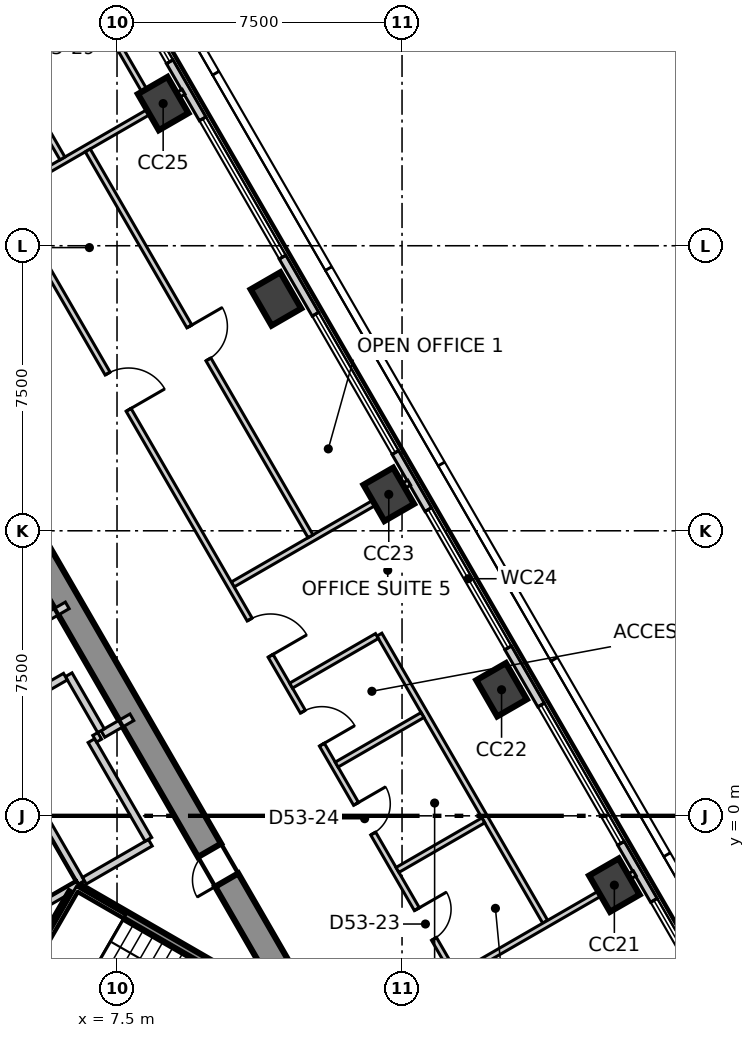
"""IFC4 building model, lengths in metres.
Left out: names, types, materials, properties, quantities, classifications, styles, units other than length and angle.
Written with IfcOpenShell. Run it as: python <this file> out.ifc"""

import sys

from ifc_helpers import new_model, si_unit, direction, frame, frame_2d, origin, origin_2d, place, context, subcontext, project, spatial, polyline, rectangle, outline, extrude, element, fill, save


model = new_model("IFC4")
c1 = context("Model", 3, precision=1e-05, world=origin(), true_north=direction((0.0, 1.0)))
c2 = subcontext(c1, "Body", "Model", "MODEL_VIEW")
j1 = project(units=[si_unit("LENGTHUNIT", "METRE"), si_unit("PLANEANGLEUNIT", "RADIAN")], contexts=[c1])
p1 = place(None, origin())
s1 = spatial("IfcSite", under=j1, at=p1, CompositionType="ELEMENT")
p2 = place(p1, origin())
s2 = spatial("IfcBuilding", under=s1, at=p2, CompositionType="ELEMENT")
p3 = place(p2, frame((0.0, 0.0, 227.3)))
s3 = spatial("IfcBuildingStorey", under=s2, at=p3, CompositionType="ELEMENT", Elevation=227.3)
p4 = place(p3, frame((12.413, -5.2, -0.3), z_axis=(0.0, 0.0, 1.0), x_axis=(-0.500011533395, 0.866018744874, 0.0)))
e1 = element("IfcWall", 1, at=p4, inside=s3, PredefinedType="SHEAR", context=c2, shape_type="SweptSolid", body=[
    extrude(outline(polyline([(-0.202, -0.35), (1.782, -0.35), (3.766, -0.35), (5.75, -0.35), (7.734, -0.35), (9.718, -0.35), (11.702, -0.35), (13.686, -0.35), (15.67, -0.35), (17.654, -0.35), (19.638, -0.35), (21.622, -0.35), (21.218, 0.35), (19.307, 0.35), (17.397, 0.35), (15.486, 0.35), (13.576, 0.35), (11.665, 0.35), (9.755, 0.35), (7.844, 0.35), (5.934, 0.35), (4.023, 0.35), (2.113, 0.35), (0.202, 0.35), (-0.202, -0.35)])), origin(), (0.0, 0.0, 1.0), 4.0),
])
p5 = place(p4, frame((4.055, 0.0, 0.3)))
e2 = element("IfcOpeningElement", 2, at=p5, cuts=e1, PredefinedType="OPENING", context=c2, shape_type="SweptSolid", body=[
    extrude(rectangle(XDim=0.9, YDim=2.1, at=frame_2d((0.45, 1.05))), frame((0.0, 0.36, 0.0), z_axis=(0.0, -1.0, 0.0), x_axis=(1.0, 0.0, 0.0)), (0.0, 0.0, 1.0), 0.72),
])
p6 = place(p4, frame((16.415, 0.0, 0.3)))
e3 = element("IfcOpeningElement", 3, at=p6, cuts=e1, PredefinedType="OPENING", context=c2, shape_type="SweptSolid", body=[
    extrude(rectangle(XDim=1.0, YDim=2.1, at=frame_2d((0.5, 1.05))), frame((0.0, 0.36, 0.0), z_axis=(0.0, -1.0, 0.0), x_axis=(1.0, 0.0, 0.0)), (0.0, 0.0, 1.0), 0.72),
])
for number, where, z_axis, x_axis in (
    (4, (20.587, -1.824, -0.3), (0.0, 0.0, 1.0), (-0.5, 0.866, 0.0)),
    (5, (17.619, 3.317, -0.3), (0.0, 0.0, 1.0), (-0.5, 0.866, 0.0)),
    (6, (14.651, 8.458, -0.3), (0.0, 0.0, 1.0), (-0.5, 0.866, 0.0)),
    (7, (11.682, 13.6, -0.3), (0.0, 0.0, 1.0), (-0.5, 0.866, 0.0)),
    (8, (8.714, 18.741, -0.3), (0.0, 0.0, 1.0), (-0.5, 0.866, 0.0)),
):
    element("IfcColumn", number, at=place(p3, frame(where, z_axis=z_axis, x_axis=x_axis)), inside=s3, PredefinedType="COLUMN", context=c2, shape_type="SweptSolid", body=[
        extrude(rectangle(XDim=1.1, YDim=0.9, at=origin_2d()), origin(), (0.0, 0.0, 1.0), 4.0),
    ])
p7 = place(p3, frame((27.782, -12.884, 0.0), z_axis=(0.0, 0.0, 1.0), x_axis=(-0.500023345841, 0.866011924637, 0.0)))
e9 = element("IfcWall", 9, at=p7, inside=s3, PredefinedType="ELEMENTEDWALL", context=c2, shape_type="SweptSolid", body=[
    extrude(rectangle(XDim=50.078, YDim=0.2, at=frame_2d((25.039, 0.0))), origin(), (0.0, 0.0, 1.0), 3.7),
])
p8 = place(p7, frame((2.171, 0.0, 0.9)))
e10 = element("IfcOpeningElement", 10, at=p8, cuts=e9, PredefinedType="OPENING", context=c2, shape_type="SweptSolid", body=[
    extrude(rectangle(XDim=4.2, YDim=2.5, at=frame_2d((2.1, 1.25))), frame((0.0, 0.11, 0.0), z_axis=(0.0, -1.0, 0.0), x_axis=(1.0, 0.0, 0.0)), (0.0, 0.0, 1.0), 0.22),
])
p9 = place(p7, frame((8.108, 0.0, 0.9)))
e11 = element("IfcOpeningElement", 11, at=p9, cuts=e9, PredefinedType="OPENING", context=c2, shape_type="SweptSolid", body=[
    extrude(rectangle(XDim=4.2, YDim=2.5, at=frame_2d((2.1, 1.25))), frame((0.0, 0.11, 0.0), z_axis=(0.0, -1.0, 0.0), x_axis=(1.0, 0.0, 0.0)), (0.0, 0.0, 1.0), 0.22),
])
p10 = place(p7, frame((14.044, 0.0, 0.9)))
e12 = element("IfcOpeningElement", 12, at=p10, cuts=e9, PredefinedType="OPENING", context=c2, shape_type="SweptSolid", body=[
    extrude(rectangle(XDim=4.2, YDim=2.5, at=frame_2d((2.1, 1.25))), frame((0.0, 0.11, 0.0), z_axis=(0.0, -1.0, 0.0), x_axis=(1.0, 0.0, 0.0)), (0.0, 0.0, 1.0), 0.22),
])
p11 = place(p7, frame((19.981, 0.0, 0.9)))
e13 = element("IfcOpeningElement", 13, at=p11, cuts=e9, PredefinedType="OPENING", context=c2, shape_type="SweptSolid", body=[
    extrude(rectangle(XDim=4.2, YDim=2.5, at=frame_2d((2.1, 1.25))), frame((0.0, 0.11, 0.0), z_axis=(0.0, -1.0, 0.0), x_axis=(1.0, 0.0, 0.0)), (0.0, 0.0, 1.0), 0.22),
])
p12 = place(p7, frame((25.917, 0.0, 0.9)))
e14 = element("IfcOpeningElement", 14, at=p12, cuts=e9, PredefinedType="OPENING", context=c2, shape_type="SweptSolid", body=[
    extrude(rectangle(XDim=4.2, YDim=2.5, at=frame_2d((2.1, 1.25))), frame((0.0, 0.11, 0.0), z_axis=(0.0, -1.0, 0.0), x_axis=(1.0, 0.0, 0.0)), (0.0, 0.0, 1.0), 0.22),
])
p13 = place(p7, frame((31.854, 0.0, 0.9)))
e15 = element("IfcOpeningElement", 15, at=p13, cuts=e9, PredefinedType="OPENING", context=c2, shape_type="SweptSolid", body=[
    extrude(rectangle(XDim=4.2, YDim=2.5, at=frame_2d((2.1, 1.25))), frame((0.0, 0.11, 0.0), z_axis=(0.0, -1.0, 0.0), x_axis=(1.0, 0.0, 0.0)), (0.0, 0.0, 1.0), 0.22),
])
p14 = place(p7, frame((37.79, 0.0, 0.9)))
e16 = element("IfcOpeningElement", 16, at=p14, cuts=e9, PredefinedType="OPENING", context=c2, shape_type="SweptSolid", body=[
    extrude(rectangle(XDim=4.2, YDim=2.5, at=frame_2d((2.1, 1.25))), frame((0.0, 0.11, 0.0), z_axis=(0.0, -1.0, 0.0), x_axis=(1.0, 0.0, 0.0)), (0.0, 0.0, 1.0), 0.22),
])
p15 = place(p7, frame((43.727, 0.0, 0.9)))
e17 = element("IfcOpeningElement", 17, at=p15, cuts=e9, PredefinedType="OPENING", context=c2, shape_type="SweptSolid", body=[
    extrude(rectangle(XDim=4.2, YDim=2.5, at=frame_2d((2.1, 1.25))), frame((0.0, 0.11, 0.0), z_axis=(0.0, -1.0, 0.0), x_axis=(1.0, 0.0, 0.0)), (0.0, 0.0, 1.0), 0.22),
])
p16 = place(p3, frame((10.544, 6.087, 0.0), z_axis=(0.0, 0.0, 1.0), x_axis=(0.866032438121, 0.499987815973, 0.0)))
e18 = element("IfcWall", 18, at=p16, inside=s3, PredefinedType="PARTITIONING", context=c2, shape_type="SweptSolid", body=[
    extrude(rectangle(XDim=5.363, YDim=0.15, at=frame_2d((2.681, 0.0))), origin(), (0.0, 0.0, 1.0), 3.2),
])
p17 = place(p3, frame((0.075, 24.07, 0.0), z_axis=(0.0, 0.0, 1.0), x_axis=(0.49999939571, -0.866025752671, 0.0)))
e19 = element("IfcWall", 19, at=p17, inside=s3, PredefinedType="PARTITIONING", context=c2, shape_type="SweptSolid", body=[
    extrude(rectangle(XDim=41.614, YDim=0.15, at=frame_2d((20.807, 0.0))), origin(), (0.0, 0.0, 1.0), 3.7),
])
p18 = place(p17, frame((36.714, 0.0, 0.0)))
e20 = element("IfcOpeningElement", 20, at=p18, cuts=e19, PredefinedType="OPENING", context=c2, shape_type="SweptSolid", body=[
    extrude(rectangle(XDim=1.1, YDim=2.1, at=frame_2d((0.55, 1.05))), frame((0.0, 0.085, 0.0), z_axis=(0.0, -1.0, 0.0), x_axis=(1.0, 0.0, 0.0)), (0.0, 0.0, 1.0), 0.17),
])
p19 = place(p17, frame((21.831, 0.0, 0.0)))
e21 = element("IfcOpeningElement", 21, at=p19, cuts=e19, PredefinedType="OPENING", context=c2, shape_type="SweptSolid", body=[
    extrude(rectangle(XDim=1.1, YDim=2.1, at=frame_2d((0.55, 1.05))), frame((0.0, 0.085, 0.0), z_axis=(0.0, -1.0, 0.0), x_axis=(1.0, 0.0, 0.0)), (0.0, 0.0, 1.0), 0.17),
])
p20 = place(p17, frame((30.631, 0.0, 0.0)))
e22 = element("IfcOpeningElement", 22, at=p20, cuts=e19, PredefinedType="OPENING", context=c2, shape_type="SweptSolid", body=[
    extrude(rectangle(XDim=0.9, YDim=2.1, at=frame_2d((0.45, 1.05))), frame((0.0, 0.085, 0.0), z_axis=(0.0, -1.0, 0.0), x_axis=(1.0, 0.0, 0.0)), (0.0, 0.0, 1.0), 0.17),
])
p21 = place(p17, frame((27.431, 0.0, 0.0)))
e23 = element("IfcOpeningElement", 23, at=p21, cuts=e19, PredefinedType="OPENING", context=c2, shape_type="SweptSolid", body=[
    extrude(rectangle(XDim=0.9, YDim=2.1, at=frame_2d((0.45, 1.05))), frame((0.0, 0.085, 0.0), z_axis=(0.0, -1.0, 0.0), x_axis=(1.0, 0.0, 0.0)), (0.0, 0.0, 1.0), 0.17),
])
p22 = place(p17, frame((24.631, 0.0, 0.0)))
e24 = element("IfcOpeningElement", 24, at=p22, cuts=e19, PredefinedType="OPENING", context=c2, shape_type="SweptSolid", body=[
    extrude(rectangle(XDim=1.0, YDim=2.1, at=frame_2d((0.5, 1.05))), frame((0.0, 0.085, 0.0), z_axis=(0.0, -1.0, 0.0), x_axis=(1.0, 0.0, 0.0)), (0.0, 0.0, 1.0), 0.17),
])
p23 = place(p17, frame((14.358, 0.0, 0.0)))
e25 = element("IfcOpeningElement", 25, at=p23, cuts=e19, PredefinedType="OPENING", context=c2, shape_type="SweptSolid", body=[
    extrude(rectangle(XDim=1.1, YDim=2.1, at=frame_2d((0.55, 1.05))), frame((0.0, 0.085, 0.0), z_axis=(0.0, -1.0, 0.0), x_axis=(1.0, 0.0, 0.0)), (0.0, 0.0, 1.0), 0.17),
])
p24 = place(p17, frame((3.885, 0.0, 0.0)))
e26 = element("IfcOpeningElement", 26, at=p24, cuts=e19, PredefinedType="OPENING", context=c2, shape_type="SweptSolid", body=[
    extrude(rectangle(XDim=1.1, YDim=2.1, at=frame_2d((0.55, 1.05))), frame((0.0, 0.085, 0.0), z_axis=(0.0, -1.0, 0.0), x_axis=(1.0, 0.0, 0.0)), (0.0, 0.0, 1.0), 0.17),
])
p25 = place(p3, frame((4.607, 16.37, 0.0), z_axis=(0.0, 0.0, 1.0), x_axis=(0.866052151752, 0.499953668299, 0.0)))
e27 = element("IfcWall", 27, at=p25, inside=s3, PredefinedType="PARTITIONING", context=c2, shape_type="SweptSolid", body=[
    extrude(rectangle(XDim=5.362, YDim=0.15, at=frame_2d((2.681, 0.0))), origin(), (0.0, 0.0, 1.0), 3.7),
])
p26 = place(p3, frame((14.404, 4.768, 0.0), z_axis=(0.0, 0.0, 1.0), x_axis=(0.500042162787, -0.86600105972, 0.0)))
e28 = element("IfcWall", 28, at=p26, inside=s3, PredefinedType="PARTITIONING", context=c2, shape_type="SweptSolid", body=[
    extrude(rectangle(XDim=8.725, YDim=0.15, at=frame_2d((4.363, 0.0))), origin(), (0.0, 0.0, 1.0), 3.7),
])
for number, where, z_axis, x_axis in (
    (29, (12.08, 3.426, 0.0), (0.0, 0.0, 1.0), (0.866, 0.5, 0.0)),
    (30, (13.28, 1.348, 0.0), (0.0, 0.0, 1.0), (0.866, 0.5, 0.0)),
):
    element("IfcWall", number, at=place(p3, frame(where, z_axis=z_axis, x_axis=x_axis)), inside=s3, PredefinedType="PARTITIONING", context=c2, shape_type="SweptSolid", body=[
        extrude(rectangle(XDim=2.608, YDim=0.15, at=frame_2d((1.304, 0.0))), origin(), (0.0, 0.0, 1.0), 3.7),
    ])
p27 = place(p3, frame((14.88, -1.424, 0.0), z_axis=(0.0, 0.0, 1.0), x_axis=(0.865872279416, 0.500265125447, 0.0)))
e31 = element("IfcWall", 31, at=p27, inside=s3, PredefinedType="PARTITIONING", context=c2, shape_type="SweptSolid", body=[
    extrude(rectangle(XDim=2.609, YDim=0.15, at=frame_2d((1.304, 0.0))), origin(), (0.0, 0.0, 1.0), 3.7),
])
p28 = place(p3, frame((16.48, -4.195, 0.0), z_axis=(0.0, 0.0, 1.0), x_axis=(0.866032438121, 0.499987815973, 0.0)))
e32 = element("IfcWall", 32, at=p28, inside=s3, PredefinedType="PARTITIONING", context=c2, shape_type="SweptSolid", body=[
    extrude(rectangle(XDim=5.363, YDim=0.15, at=frame_2d((2.681, 0.0))), origin(), (0.0, 0.0, 1.0), 3.7),
])
p29 = place(p3, frame((5.59, 23.635, 0.0), z_axis=(0.0, 0.0, 1.0), x_axis=(0.500037442639, -0.866003785188, 0.0)))
e33 = element("IfcWall", 33, at=p29, inside=s3, PredefinedType="PARTITIONING", context=c2, shape_type="SweptSolid", body=[
    extrude(rectangle(XDim=5.725, YDim=0.15, at=frame_2d((2.863, 0.0))), origin(), (0.0, 0.0, 1.0), 2.95),
])
p30 = place(p3, frame((3.239, 22.19, 0.0), z_axis=(0.0, 0.0, 1.0), x_axis=(0.500010476433, -0.866019355129, 0.0)))
e34 = element("IfcWall", 34, at=p30, inside=s3, PredefinedType="PARTITIONING", context=c2, shape_type="SweptSolid", body=[
    extrude(rectangle(XDim=5.65, YDim=0.15, at=frame_2d((2.825, 0.0))), origin(), (0.0, 0.0, 1.0), 3.7),
])
p31 = place(p30, frame((3.474, 0.0, 0.0)))
e35 = element("IfcOpeningElement", 35, at=p31, cuts=e34, PredefinedType="OPENING", context=c2, shape_type="SweptSolid", body=[
    extrude(rectangle(XDim=0.9, YDim=2.1, at=frame_2d((0.45, 1.05))), frame((0.0, 0.085, 0.0), z_axis=(0.0, -1.0, 0.0), x_axis=(1.0, 0.0, 0.0)), (0.0, 0.0, 1.0), 0.17),
])
p32 = place(p3, frame((6.73, 17.509, 0.0), z_axis=(0.0, 0.0, 1.0), x_axis=(0.500011469263, -0.866018781901, 0.0)))
e36 = element("IfcWall", 36, at=p32, inside=s3, PredefinedType="PARTITIONING", context=c2, shape_type="SweptSolid", body=[
    extrude(rectangle(XDim=11.724, YDim=0.15, at=frame_2d((5.862, 0.0))), origin(), (0.0, 0.0, 1.0), 3.7),
])
p33 = place(p32, frame((5.349, 0.0, 0.0)))
e37 = element("IfcOpeningElement", 37, at=p33, cuts=e36, PredefinedType="OPENING", context=c2, shape_type="SweptSolid", body=[
    extrude(rectangle(XDim=1.0, YDim=2.1, at=frame_2d((0.5, 1.05))), frame((0.0, 0.085, 0.0), z_axis=(0.0, -1.0, 0.0), x_axis=(1.0, 0.0, 0.0)), (0.0, 0.0, 1.0), 0.17),
])
p34 = place(p3, frame((1.578, 2.874, 0.0), z_axis=(0.0, 0.0, 1.0), x_axis=(0.866045911672, 0.499964477614, 0.0)))
e38 = element("IfcWall", 38, at=p34, inside=s3, PredefinedType="SOLIDWALL", context=c2, shape_type="SweptSolid", body=[
    extrude(rectangle(XDim=5.327, YDim=0.2, at=frame_2d((2.663, 0.0))), origin(), (0.0, 0.0, 1.0), 3.7),
])
p35 = place(p34, frame((2.496, 0.0, 0.0)))
e39 = element("IfcOpeningElement", 39, at=p35, cuts=e38, PredefinedType="OPENING", context=c2, shape_type="SweptSolid", body=[
    extrude(rectangle(XDim=1.1, YDim=2.1, at=frame_2d((0.55, 1.05))), frame((0.0, 0.11, 0.0), z_axis=(0.0, -1.0, 0.0), x_axis=(1.0, 0.0, 0.0)), (0.0, 0.0, 1.0), 0.22),
])
p36 = place(p3, frame((7.129, 2.153, 0.0), z_axis=(0.0, 0.0, 1.0), x_axis=(0.866083962871, 0.499898558967, 0.0)))
e40 = element("IfcWall", 40, at=p36, inside=s3, PredefinedType="SOLIDWALL", context=c2, shape_type="SweptSolid", body=[
    extrude(rectangle(XDim=0.88, YDim=0.2, at=frame_2d((0.44, 0.0))), origin(), (0.0, 0.0, 1.0), 3.7),
])
p37 = place(p3, frame((5.057, 0.841, 0.0), z_axis=(0.0, 0.0, 1.0), x_axis=(0.499990139034, -0.866031096941, 0.0)))
e41 = element("IfcWall", 41, at=p37, inside=s3, PredefinedType="SOLIDWALL", context=c2, shape_type="SweptSolid", body=[
    extrude(rectangle(XDim=3.0, YDim=0.2, at=frame_2d((1.5, 0.0))), origin(), (0.0, 0.0, 1.0), 3.7),
])
p38 = place(p3, frame((4.9, -2.714, 0.0), z_axis=(0.0, 0.0, 1.0), x_axis=(0.865846928409, 0.500309001083, 0.0)))
e42 = element("IfcWall", 42, at=p38, inside=s3, PredefinedType="SOLIDWALL", context=c2, shape_type="SweptSolid", body=[
    extrude(rectangle(XDim=1.813, YDim=0.2, at=frame_2d((0.907, 0.0))), origin(), (0.0, 0.0, 1.0), 3.7),
])
p39 = place(p3, frame((6.229, 3.712, 0.0), z_axis=(0.0, 0.0, 1.0), x_axis=(0.499875724984, -0.86609714211, 0.0)))
e43 = element("IfcWall", 43, at=p39, inside=s3, PredefinedType="SOLIDWALL", context=c2, shape_type="SweptSolid", body=[
    extrude(rectangle(XDim=1.701, YDim=0.2, at=frame_2d((0.85, 0.0))), origin(), (0.0, 0.0, 1.0), 3.7),
])
p40 = place(p3, frame((2.548, 1.587, 0.0), z_axis=(0.0, 0.0, 1.0), x_axis=(0.866004344652, 0.500036473714, 0.0)))
e44 = element("IfcWall", 44, at=p40, inside=s3, PredefinedType="SOLIDWALL", context=c2, shape_type="SweptSolid", body=[
    extrude(rectangle(XDim=4.15, YDim=0.2, at=frame_2d((2.075, 0.0))), origin(), (0.0, 0.0, 1.0), 3.7),
])
p41 = place(p40, frame((1.675, 0.0, 0.0)))
e45 = element("IfcOpeningElement", 45, at=p41, cuts=e44, PredefinedType="OPENING", context=c2, shape_type="SweptSolid", body=[
    extrude(rectangle(XDim=0.9, YDim=2.1, at=frame_2d((0.45, 1.05))), frame((0.0, 0.11, 0.0), z_axis=(0.0, -1.0, 0.0), x_axis=(1.0, 0.0, 0.0)), (0.0, 0.0, 1.0), 0.22),
])
p42 = place(p3, frame((6.642, -1.708, 0.0), z_axis=(0.0, 0.0, 1.0), x_axis=(0.866043441391, 0.499968756647, 0.0)))
e46 = element("IfcWall", 46, at=p42, inside=s3, PredefinedType="SOLIDWALL", context=c2, shape_type="SweptSolid", body=[
    extrude(rectangle(XDim=2.002, YDim=0.2, at=frame_2d((1.001, 0.0))), origin(), (0.0, 0.0, 1.0), 3.7),
])
p43 = place(p3, frame((6.826, 1.978, 0.0), z_axis=(0.0, 0.0, 1.0), x_axis=(0.499990139034, -0.866031096941, 0.0)))
e47 = element("IfcWall", 47, at=p43, inside=s3, PredefinedType="SOLIDWALL", context=c2, shape_type="SweptSolid", body=[
    extrude(rectangle(XDim=3.0, YDim=0.2, at=frame_2d((1.5, 0.0))), origin(), (0.0, 0.0, 1.0), 3.7),
])
p44 = place(p3, frame((6.912, 2.028, 0.0), z_axis=(0.0, 0.0, 1.0), x_axis=(0.866559367082, 0.499074005857, 0.0)))
e48 = element("IfcWall", 48, at=p44, inside=s3, PredefinedType="SOLIDWALL", context=c2, shape_type="SweptSolid", body=[
    extrude(rectangle(XDim=0.152, YDim=0.2, at=frame_2d((0.076, 0.0))), origin(), (0.0, 0.0, 1.0), 3.7),
])
p45 = place(p3, frame((4.929, -4.462, 0.0), z_axis=(0.0, 0.0, 1.0), x_axis=(0.500200581029, 0.865909567298, 0.0)))
e49 = element("IfcWall", 49, at=p45, inside=s3, PredefinedType="SOLIDWALL", context=c2, shape_type="SweptSolid", body=[
    extrude(rectangle(XDim=2.799, YDim=0.2, at=frame_2d((1.399, 0.0))), origin(), (0.0, 0.0, 1.0), 3.7),
])
p46 = place(p3, frame((6.529, -1.922, 0.0), z_axis=(0.0, 0.0, 1.0), x_axis=(0.866046323291, -0.499963764601, 0.0)))
e50 = element("IfcWall", 50, at=p46, inside=s3, PredefinedType="SOLIDWALL", context=c2, shape_type="SweptSolid", body=[
    extrude(rectangle(XDim=6.714, YDim=0.2, at=frame_2d((3.357, 0.0))), origin(), (0.0, 0.0, 1.0), 3.7),
])
p47 = place(p9, origin())
e51 = element("IfcWindow", 51, at=p47, inside=s3, PartitioningType="SINGLE_PANEL", PredefinedType="WINDOW", context=c2, shape_type="SweptSolid", body=[
    extrude(rectangle(XDim=4.2, YDim=2.5, at=frame_2d((2.1, 1.25))), frame((0.0, 0.03, 0.0), z_axis=(0.0, -1.0, 0.0), x_axis=(1.0, 0.0, 0.0)), (0.0, 0.0, 1.0), 0.06),
])
fill(e11, e51)
p48 = place(p10, origin())
e52 = element("IfcWindow", 52, at=p48, inside=s3, PartitioningType="SINGLE_PANEL", PredefinedType="WINDOW", context=c2, shape_type="SweptSolid", body=[
    extrude(rectangle(XDim=4.2, YDim=2.5, at=frame_2d((2.1, 1.25))), frame((0.0, 0.03, 0.0), z_axis=(0.0, -1.0, 0.0), x_axis=(1.0, 0.0, 0.0)), (0.0, 0.0, 1.0), 0.06),
])
fill(e12, e52)
p49 = place(p11, origin())
e53 = element("IfcWindow", 53, at=p49, inside=s3, PartitioningType="SINGLE_PANEL", PredefinedType="WINDOW", context=c2, shape_type="SweptSolid", body=[
    extrude(rectangle(XDim=4.2, YDim=2.5, at=frame_2d((2.1, 1.25))), frame((0.0, 0.03, 0.0), z_axis=(0.0, -1.0, 0.0), x_axis=(1.0, 0.0, 0.0)), (0.0, 0.0, 1.0), 0.06),
])
fill(e13, e53)
p50 = place(p12, origin())
e54 = element("IfcWindow", 54, at=p50, inside=s3, PartitioningType="SINGLE_PANEL", PredefinedType="WINDOW", context=c2, shape_type="SweptSolid", body=[
    extrude(rectangle(XDim=4.2, YDim=2.5, at=frame_2d((2.1, 1.25))), frame((0.0, 0.03, 0.0), z_axis=(0.0, -1.0, 0.0), x_axis=(1.0, 0.0, 0.0)), (0.0, 0.0, 1.0), 0.06),
])
fill(e14, e54)
p51 = place(p13, origin())
e55 = element("IfcWindow", 55, at=p51, inside=s3, PartitioningType="SINGLE_PANEL", PredefinedType="WINDOW", context=c2, shape_type="SweptSolid", body=[
    extrude(rectangle(XDim=4.2, YDim=2.5, at=frame_2d((2.1, 1.25))), frame((0.0, 0.03, 0.0), z_axis=(0.0, -1.0, 0.0), x_axis=(1.0, 0.0, 0.0)), (0.0, 0.0, 1.0), 0.06),
])
fill(e15, e55)
p52 = place(p14, origin())
e56 = element("IfcWindow", 56, at=p52, inside=s3, PartitioningType="SINGLE_PANEL", PredefinedType="WINDOW", context=c2, shape_type="SweptSolid", body=[
    extrude(rectangle(XDim=4.2, YDim=2.5, at=frame_2d((2.1, 1.25))), frame((0.0, 0.03, 0.0), z_axis=(0.0, -1.0, 0.0), x_axis=(1.0, 0.0, 0.0)), (0.0, 0.0, 1.0), 0.06),
])
fill(e16, e56)
p53 = place(p19, origin())
e57 = element("IfcDoor", 57, at=p53, inside=s3, OperationType="SINGLE_SWING_LEFT", PredefinedType="DOOR", context=c2, shape_type="SweptSolid", body=[
    extrude(rectangle(XDim=1.1, YDim=2.1, at=frame_2d((0.55, 1.05))), frame((0.0, 0.025, 0.0), z_axis=(0.0, -1.0, 0.0), x_axis=(1.0, 0.0, 0.0)), (0.0, 0.0, 1.0), 0.05),
])
fill(e21, e57)
p54 = place(p20, origin())
e58 = element("IfcDoor", 58, at=p54, inside=s3, OperationType="SINGLE_SWING_RIGHT", PredefinedType="DOOR", context=c2, shape_type="SweptSolid", body=[
    extrude(rectangle(XDim=0.9, YDim=2.1, at=frame_2d((0.45, 1.05))), frame((0.0, 0.025, 0.0), z_axis=(0.0, -1.0, 0.0), x_axis=(1.0, 0.0, 0.0)), (0.0, 0.0, 1.0), 0.05),
])
fill(e22, e58)
p55 = place(p21, origin())
e59 = element("IfcDoor", 59, at=p55, inside=s3, OperationType="SINGLE_SWING_RIGHT", PredefinedType="DOOR", context=c2, shape_type="SweptSolid", body=[
    extrude(rectangle(XDim=0.9, YDim=2.1, at=frame_2d((0.45, 1.05))), frame((0.0, 0.025, 0.0), z_axis=(0.0, -1.0, 0.0), x_axis=(1.0, 0.0, 0.0)), (0.0, 0.0, 1.0), 0.05),
])
fill(e23, e59)
p56 = place(p22, origin())
e60 = element("IfcDoor", 60, at=p56, inside=s3, OperationType="SINGLE_SWING_LEFT", PredefinedType="DOOR", context=c2, shape_type="SweptSolid", body=[
    extrude(rectangle(XDim=1.0, YDim=2.1, at=frame_2d((0.5, 1.05))), frame((0.0, 0.025, 0.0), z_axis=(0.0, -1.0, 0.0), x_axis=(1.0, 0.0, 0.0)), (0.0, 0.0, 1.0), 0.05),
])
fill(e24, e60)
p57 = place(p23, origin())
e61 = element("IfcDoor", 61, at=p57, inside=s3, OperationType="SINGLE_SWING_LEFT", PredefinedType="DOOR", context=c2, shape_type="SweptSolid", body=[
    extrude(rectangle(XDim=1.1, YDim=2.1, at=frame_2d((0.55, 1.05))), frame((0.0, 0.025, 0.0), z_axis=(0.0, -1.0, 0.0), x_axis=(1.0, 0.0, 0.0)), (0.0, 0.0, 1.0), 0.05),
])
fill(e25, e61)
p58 = place(p33, origin())
e62 = element("IfcDoor", 62, at=p58, inside=s3, OperationType="SINGLE_SWING_RIGHT", PredefinedType="DOOR", context=c2, shape_type="SweptSolid", body=[
    extrude(rectangle(XDim=1.0, YDim=2.1, at=frame_2d((0.5, 1.05))), frame((0.0, 0.025, 0.0), z_axis=(0.0, -1.0, 0.0), x_axis=(1.0, 0.0, 0.0)), (0.0, 0.0, 1.0), 0.05),
])
fill(e37, e62)
p59 = place(p5, origin())
e63 = element("IfcDoor", 63, at=p59, inside=s3, OperationType="SINGLE_SWING_RIGHT", PredefinedType="DOOR", context=c2, shape_type="SweptSolid", body=[
    extrude(rectangle(XDim=0.9, YDim=2.1, at=frame_2d((0.45, 1.05))), frame((0.0, 0.025, 0.0), z_axis=(0.0, -1.0, 0.0), x_axis=(1.0, 0.0, 0.0)), (0.0, 0.0, 1.0), 0.05),
])
fill(e2, e63)
save(model, sys.argv[1])
